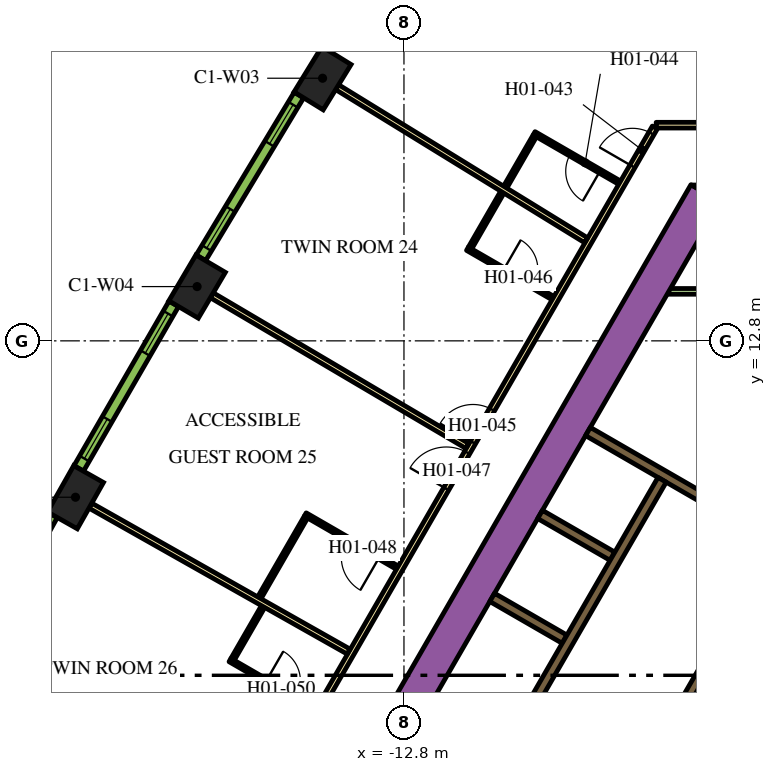
"""IFC4 building model, lengths in metres.
Left out: names, types, materials, properties, quantities, classifications, styles, units other than length and angle.
Written with IfcOpenShell. Run it as: python <this file> out.ifc"""

import sys

from ifc_helpers import new_model, si_unit, direction, frame, frame_2d, origin, origin_2d, place, context, subcontext, project, spatial, polyline, rectangle, outline, extrude, element, fill, save


model = new_model("IFC4")
c1 = context("Model", 3, precision=1e-05, world=origin(), true_north=direction((0.0, 1.0)))
c2 = subcontext(c1, "Body", "Model", "MODEL_VIEW")
j1 = project(units=[si_unit("LENGTHUNIT", "METRE"), si_unit("PLANEANGLEUNIT", "RADIAN")], contexts=[c1])
p1 = place(None, origin())
s1 = spatial("IfcSite", under=j1, at=p1, CompositionType="ELEMENT")
p2 = place(p1, origin())
s2 = spatial("IfcBuilding", under=s1, at=p2, CompositionType="ELEMENT")
p3 = place(p2, frame((0.0, 0.0, 27.6)))
s3 = spatial("IfcBuildingStorey", under=s2, at=p3, CompositionType="ELEMENT", Elevation=27.6)
for number, where, z_axis, x_axis in (
    (1, (-14.942, 19.71, 0.0), (0.0, 0.0, 1.0), (-0.524, -0.852, 0.0)),
    (2, (-18.243, 14.228, 0.0), (0.0, 0.0, 1.0), (-0.508, -0.861, 0.0)),
    (3, (-21.443, 8.685, 0.0), (0.0, 0.0, 1.0), (-0.492, -0.871, 0.0)),
):
    element("IfcColumn", number, at=place(p3, frame(where, z_axis=z_axis, x_axis=x_axis)), inside=s3, PredefinedType="COLUMN", context=c2, shape_type="SweptSolid", body=[
        extrude(rectangle(XDim=1.4, YDim=0.9, at=origin_2d()), origin(), (0.0, 0.0, 1.0), 3.9),
    ])
p4 = place(p3, frame((-15.36, -1.503, 0.0), z_axis=(0.0, 0.0, 1.0), x_axis=(0.50000389221, 0.866023156604, 0.0)))
e4 = element("IfcWall", 4, at=p4, inside=s3, PredefinedType="SOLIDWALL", context=c2, shape_type="SweptSolid", body=[
    extrude(rectangle(XDim=21.0, YDim=0.9, at=frame_2d((10.5, 0.0))), origin(), (0.0, 0.0, 1.0), 3.9),
])
p5 = place(p3, origin())
e5 = element("IfcWall", 5, at=p5, inside=s3, PredefinedType="SOLIDWALL", context=c2, shape_type="SweptSolid", body=[
    extrude(outline(polyline([(-4.215, 16.9), (-4.469, 16.46), (-5.231, 16.9), (-4.215, 16.9)])), origin(), (0.0, 0.0, 1.0), 3.9),
])
p6 = place(p3, frame((-8.06, -1.311, 0.0), z_axis=(0.0, 0.0, 1.0), x_axis=(0.50000273126, 0.866023826885, 0.0)))
e6 = element("IfcWall", 6, at=p6, inside=s3, PredefinedType="SOLIDWALL", context=c2, shape_type="SweptSolid", body=[
    extrude(rectangle(XDim=10.33, YDim=0.25, at=frame_2d((5.165, 0.0))), origin(), (0.0, 0.0, 1.0), 3.9),
])
for number, where, z_axis, x_axis in (
    (7, (-8.574, 4.95, 0.0), (0.0, 0.0, 1.0), (-0.866, 0.5, 0.0)),
    (8, (-7.314, 7.132, 0.0), (0.0, 0.0, 1.0), (-0.866, 0.5, 0.0)),
):
    element("IfcWall", number, at=place(p3, frame(where, z_axis=z_axis, x_axis=x_axis)), inside=s3, PredefinedType="SOLIDWALL", context=c2, shape_type="SweptSolid", body=[
        extrude(rectangle(XDim=2.2, YDim=0.25, at=frame_2d((1.1, 0.0))), origin(), (0.0, 0.0, 1.0), 3.9),
    ])
p7 = place(p3, frame((-7.959, 10.415, 0.0), z_axis=(0.0, 0.0, 1.0), x_axis=(0.866020958405, -0.500007699544, 0.0)))
e9 = element("IfcWall", 9, at=p7, inside=s3, PredefinedType="SOLIDWALL", context=c2, shape_type="SweptSolid", body=[
    extrude(rectangle(XDim=4.1, YDim=0.25, at=frame_2d((2.05, 0.0))), origin(), (0.0, 0.0, 1.0), 3.9),
])
p8 = place(p3, frame((-5.851, 14.102, 0.0), z_axis=(0.0, 0.0, 1.0), x_axis=(1.0, 0.0, 0.0)))
e10 = element("IfcWall", 10, at=p8, inside=s3, PredefinedType="PARTITIONING", context=c2, shape_type="SweptSolid", body=[
    extrude(rectangle(XDim=1.18, YDim=0.15, at=frame_2d((0.59, 0.0))), origin(), (0.0, 0.0, 1.0), 2.75),
])
p9 = place(p3, frame((-6.008, 9.144, 0.0), z_axis=(0.0, 0.0, 1.0), x_axis=(-0.500006956611, -0.866021387346, 0.0)))
e11 = element("IfcWall", 11, at=p9, inside=s3, PredefinedType="SOLIDWALL", context=c2, shape_type="SweptSolid", body=[
    extrude(rectangle(XDim=9.83, YDim=0.25, at=frame_2d((4.915, 0.0))), origin(), (0.0, 0.0, 1.0), 3.9),
])
p10 = place(p9, frame((6.985, 0.0, 0.0)))
e12 = element("IfcOpeningElement", 12, at=p10, cuts=e11, PredefinedType="OPENING", context=c2, shape_type="SweptSolid", body=[
    extrude(rectangle(XDim=0.9, YDim=2.1, at=frame_2d((0.45, 1.05))), frame((0.0, 0.135, 0.0), z_axis=(0.0, -1.0, 0.0), x_axis=(1.0, 0.0, 0.0)), (0.0, 0.0, 1.0), 0.27),
])
p11 = place(p3, frame((-0.898, 6.194, 0.0), z_axis=(0.0, 0.0, 1.0), x_axis=(-0.499996202215, -0.866027596426, 0.0)))
e13 = element("IfcWall", 13, at=p11, inside=s3, PredefinedType="SOLIDWALL", context=c2, shape_type="SweptSolid", body=[
    extrude(rectangle(XDim=9.83, YDim=0.25, at=frame_2d((4.915, 0.0))), origin(), (0.0, 0.0, 1.0), 3.9),
])
p12 = place(p11, frame((0.585, 0.0, 0.0)))
e14 = element("IfcOpeningElement", 14, at=p12, cuts=e13, PredefinedType="OPENING", context=c2, shape_type="SweptSolid", body=[
    extrude(rectangle(XDim=1.1, YDim=2.1, at=frame_2d((0.55, 1.05))), frame((0.0, 0.135, 0.0), z_axis=(0.0, -1.0, 0.0), x_axis=(1.0, 0.0, 0.0)), (0.0, 0.0, 1.0), 0.27),
])
p13 = place(p11, frame((3.105, 0.0, 0.0)))
e15 = element("IfcOpeningElement", 15, at=p13, cuts=e13, PredefinedType="OPENING", context=c2, shape_type="SweptSolid", body=[
    extrude(rectangle(XDim=1.1, YDim=2.1, at=frame_2d((0.55, 1.05))), frame((0.0, 0.135, 0.0), z_axis=(0.0, -1.0, 0.0), x_axis=(1.0, 0.0, 0.0)), (0.0, 0.0, 1.0), 0.27),
])
p14 = place(p11, frame((5.625, 0.0, 0.0)))
e16 = element("IfcOpeningElement", 16, at=p14, cuts=e13, PredefinedType="OPENING", context=c2, shape_type="SweptSolid", body=[
    extrude(rectangle(XDim=1.1, YDim=2.1, at=frame_2d((0.55, 1.05))), frame((0.0, 0.135, 0.0), z_axis=(0.0, -1.0, 0.0), x_axis=(1.0, 0.0, 0.0)), (0.0, 0.0, 1.0), 0.27),
])
p15 = place(p11, frame((8.145, 0.0, 0.0)))
e17 = element("IfcOpeningElement", 17, at=p15, cuts=e13, PredefinedType="OPENING", context=c2, shape_type="SweptSolid", body=[
    extrude(rectangle(XDim=1.1, YDim=2.1, at=frame_2d((0.55, 1.05))), frame((0.0, 0.135, 0.0), z_axis=(0.0, -1.0, 0.0), x_axis=(1.0, 0.0, 0.0)), (0.0, 0.0, 1.0), 0.27),
])
p16 = place(p3, frame((-6.163, 18.475, 0.0), z_axis=(0.0, 0.0, 1.0), x_axis=(1.0, 0.0, 0.0)))
e18 = element("IfcWall", 18, at=p16, inside=s3, PredefinedType="PARTITIONING", context=c2, shape_type="SweptSolid", body=[
    extrude(rectangle(XDim=5.258, YDim=0.15, at=frame_2d((2.629, 0.0))), origin(), (0.0, 0.0, 1.0), 2.75),
])
p17 = place(p3, frame((-19.081, -3.9, 0.0), z_axis=(0.0, 0.0, 1.0), x_axis=(0.499998313975, 0.866026377209, 0.0)))
e19 = element("IfcWall", 19, at=p17, inside=s3, PredefinedType="PARTITIONING", context=c2, shape_type="SweptSolid", body=[
    extrude(rectangle(XDim=25.766, YDim=0.15, at=frame_2d((12.883, 0.0))), origin(), (0.0, 0.0, 1.0), 2.75),
])
p18 = place(p17, frame((24.586, 0.0, 0.0)))
e20 = element("IfcOpeningElement", 20, at=p18, cuts=e19, PredefinedType="OPENING", context=c2, shape_type="SweptSolid", body=[
    extrude(rectangle(XDim=1.0, YDim=2.1, at=frame_2d((0.5, 1.05))), frame((0.0, 0.085, 0.0), z_axis=(0.0, -1.0, 0.0), x_axis=(1.0, 0.0, 0.0)), (0.0, 0.0, 1.0), 0.17),
])
p19 = place(p17, frame((16.196, 0.0, 0.0)))
e21 = element("IfcOpeningElement", 21, at=p19, cuts=e19, PredefinedType="OPENING", context=c2, shape_type="SweptSolid", body=[
    extrude(rectangle(XDim=1.0, YDim=2.1, at=frame_2d((0.5, 1.05))), frame((0.0, 0.085, 0.0), z_axis=(0.0, -1.0, 0.0), x_axis=(1.0, 0.0, 0.0)), (0.0, 0.0, 1.0), 0.17),
])
p20 = place(p17, frame((14.789, 0.0, 0.0)))
e22 = element("IfcOpeningElement", 22, at=p20, cuts=e19, PredefinedType="OPENING", context=c2, shape_type="SweptSolid", body=[
    extrude(rectangle(XDim=1.1, YDim=2.1, at=frame_2d((0.55, 1.05))), frame((0.0, 0.085, 0.0), z_axis=(0.0, -1.0, 0.0), x_axis=(1.0, 0.0, 0.0)), (0.0, 0.0, 1.0), 0.17),
])
p21 = place(p17, frame((3.698, 0.0, 0.0)))
e23 = element("IfcOpeningElement", 23, at=p21, cuts=e19, PredefinedType="OPENING", context=c2, shape_type="SweptSolid", body=[
    extrude(rectangle(XDim=1.0, YDim=2.1, at=frame_2d((0.5, 1.05))), frame((0.0, 0.085, 0.0), z_axis=(0.0, -1.0, 0.0), x_axis=(1.0, 0.0, 0.0)), (0.0, 0.0, 1.0), 0.17),
])
p22 = place(p17, frame((1.531, 0.0, 0.0)))
e24 = element("IfcOpeningElement", 24, at=p22, cuts=e19, PredefinedType="OPENING", context=c2, shape_type="SweptSolid", body=[
    extrude(rectangle(XDim=0.9, YDim=2.1, at=frame_2d((0.45, 1.05))), frame((0.0, 0.085, 0.0), z_axis=(0.0, -1.0, 0.0), x_axis=(1.0, 0.0, 0.0)), (0.0, 0.0, 1.0), 0.17),
])
p23 = place(p3, frame((-21.052, 8.464, 0.0), z_axis=(0.0, 0.0, 1.0), x_axis=(0.87059371954, -0.492002617368, 0.0)))
e25 = element("IfcWall", 25, at=p23, inside=s3, PredefinedType="PARTITIONING", context=c2, shape_type="SweptSolid", body=[
    extrude(rectangle(XDim=7.803, YDim=0.15, at=frame_2d((3.902, 0.0))), origin(), (0.0, 0.0, 1.0), 2.75),
])
p24 = place(p3, frame((-17.856, 13.999, 0.0), z_axis=(0.0, 0.0, 1.0), x_axis=(0.861371519381, -0.507975497047, 0.0)))
e26 = element("IfcWall", 26, at=p24, inside=s3, PredefinedType="PARTITIONING", context=c2, shape_type="SweptSolid", body=[
    extrude(rectangle(XDim=7.804, YDim=0.15, at=frame_2d((3.902, 0.0))), origin(), (0.0, 0.0, 1.0), 2.75),
])
p25 = place(p3, frame((-14.558, 19.475, 0.0), z_axis=(0.0, 0.0, 1.0), x_axis=(0.851829455142, -0.523819223925, 0.0)))
e27 = element("IfcWall", 27, at=p25, inside=s3, PredefinedType="PARTITIONING", context=c2, shape_type="SweptSolid", body=[
    extrude(rectangle(XDim=7.688, YDim=0.15, at=frame_2d((3.844, 0.0))), origin(), (0.0, 0.0, 1.0), 2.75),
])
p26 = place(p3, frame((-11.16, 24.888, 0.0), z_axis=(0.0, 0.0, 1.0), x_axis=(0.84199813156, -0.539480441211, 0.0)))
e28 = element("IfcWall", 28, at=p26, inside=s3, PredefinedType="PARTITIONING", context=c2, shape_type="SweptSolid", body=[
    extrude(rectangle(XDim=11.638, YDim=0.15, at=frame_2d((5.819, 0.0))), origin(), (0.0, 0.0, 1.0), 2.75),
])
p27 = place(p3, frame((-7.124, 16.961, 0.0), z_axis=(0.0, 0.0, 1.0), x_axis=(-0.866021400173, 0.500006934395, 0.0)))
e29 = element("IfcWall", 29, at=p27, inside=s3, PredefinedType="PARTITIONING", context=c2, shape_type="SweptSolid", body=[
    extrude(rectangle(XDim=2.6, YDim=0.1, at=frame_2d((1.3, 0.0))), origin(), (0.0, 0.0, 1.0), 2.75),
])
p28 = place(p27, frame((0.6, 0.0, 0.0)))
e30 = element("IfcOpeningElement", 30, at=p28, cuts=e29, PredefinedType="OPENING", context=c2, shape_type="SweptSolid", body=[
    extrude(rectangle(XDim=0.9, YDim=2.1, at=frame_2d((0.45, 1.05))), frame((0.0, 0.06, 0.0), z_axis=(0.0, -1.0, 0.0), x_axis=(1.0, 0.0, 0.0)), (0.0, 0.0, 1.0), 0.12),
])
p29 = place(p3, frame((-9.362, 18.184, 0.0), z_axis=(0.0, 0.0, 1.0), x_axis=(-0.499992328818, -0.866029832698, 0.0)))
e31 = element("IfcWall", 31, at=p29, inside=s3, PredefinedType="PARTITIONING", context=c2, shape_type="SweptSolid", body=[
    extrude(rectangle(XDim=1.54, YDim=0.1, at=frame_2d((0.77, 0.0))), origin(), (0.0, 0.0, 1.0), 2.75),
])
p30 = place(p3, frame((-11.129, 15.224, 0.0), z_axis=(0.0, 0.0, 1.0), x_axis=(0.866021400173, -0.500006934395, 0.0)))
e32 = element("IfcWall", 32, at=p30, inside=s3, PredefinedType="PARTITIONING", context=c2, shape_type="SweptSolid", body=[
    extrude(rectangle(XDim=2.6, YDim=0.1, at=frame_2d((1.3, 0.0))), origin(), (0.0, 0.0, 1.0), 2.75),
])
p31 = place(p30, frame((1.1, 0.0, 0.0)))
e33 = element("IfcOpeningElement", 33, at=p31, cuts=e32, PredefinedType="OPENING", context=c2, shape_type="SweptSolid", body=[
    extrude(rectangle(XDim=0.9, YDim=2.1, at=frame_2d((0.45, 1.05))), frame((0.0, 0.06, 0.0), z_axis=(0.0, -1.0, 0.0), x_axis=(1.0, 0.0, 0.0)), (0.0, 0.0, 1.0), 0.12),
])
p32 = place(p3, frame((-11.061, 15.242, 0.0), z_axis=(0.0, 0.0, 1.0), x_axis=(0.499976720371, 0.866038843867, 0.0)))
e34 = element("IfcWall", 34, at=p32, inside=s3, PredefinedType="PARTITIONING", context=c2, shape_type="SweptSolid", body=[
    extrude(rectangle(XDim=1.69, YDim=0.1, at=frame_2d((0.845, 0.0))), origin(), (0.0, 0.0, 1.0), 2.75),
])
p33 = place(p3, frame((-12.972, 6.831, 0.0), z_axis=(0.0, 0.0, 1.0), x_axis=(-0.866018616679, 0.500011755427, 0.0)))
e35 = element("IfcWall", 35, at=p33, inside=s3, PredefinedType="PARTITIONING", context=c2, shape_type="SweptSolid", body=[
    extrude(rectangle(XDim=2.8, YDim=0.1, at=frame_2d((1.4, 0.0))), origin(), (0.0, 0.0, 1.0), 2.75),
])
p34 = place(p33, frame((0.55, 0.0, 0.0)))
e36 = element("IfcOpeningElement", 36, at=p34, cuts=e35, PredefinedType="OPENING", context=c2, shape_type="SweptSolid", body=[
    extrude(rectangle(XDim=1.0, YDim=2.1, at=frame_2d((0.5, 1.05))), frame((0.0, 0.06, 0.0), z_axis=(0.0, -1.0, 0.0), x_axis=(1.0, 0.0, 0.0)), (0.0, 0.0, 1.0), 0.12),
])
p35 = place(p3, frame((-15.379, 8.163, 0.0), z_axis=(0.0, 0.0, 1.0), x_axis=(-0.499987006516, -0.866032905446, 0.0)))
e37 = element("IfcWall", 37, at=p35, inside=s3, PredefinedType="PARTITIONING", context=c2, shape_type="SweptSolid", body=[
    extrude(rectangle(XDim=2.45, YDim=0.1, at=frame_2d((1.225, 0.0))), origin(), (0.0, 0.0, 1.0), 2.75),
])
p36 = place(p3, frame((-17.378, 4.401, 0.0), z_axis=(0.0, 0.0, 1.0), x_axis=(0.865997922154, -0.500047596559, 0.0)))
e38 = element("IfcWall", 38, at=p36, inside=s3, PredefinedType="PARTITIONING", context=c2, shape_type="SweptSolid", body=[
    extrude(rectangle(XDim=2.6, YDim=0.1, at=frame_2d((1.3, 0.0))), origin(), (0.0, 0.0, 1.0), 2.75),
])
p37 = place(p36, frame((1.1, 0.0, 0.0)))
e39 = element("IfcOpeningElement", 39, at=p37, cuts=e38, PredefinedType="OPENING", context=c2, shape_type="SweptSolid", body=[
    extrude(rectangle(XDim=0.9, YDim=2.1, at=frame_2d((0.45, 1.05))), frame((0.0, 0.06, 0.0), z_axis=(0.0, -1.0, 0.0), x_axis=(1.0, 0.0, 0.0)), (0.0, 0.0, 1.0), 0.12),
])
p38 = place(p3, frame((-17.309, 4.419, 0.0), z_axis=(0.0, 0.0, 1.0), x_axis=(0.499880961361, 0.866094119867, 0.0)))
e40 = element("IfcWall", 40, at=p38, inside=s3, PredefinedType="PARTITIONING", context=c2, shape_type="SweptSolid", body=[
    extrude(rectangle(XDim=1.6, YDim=0.1, at=frame_2d((0.8, 0.0))), origin(), (0.0, 0.0, 1.0), 2.75),
])
p39 = place(p3, frame((-12.17, 24.699, 0.0), z_axis=(0.0, 0.0, 1.0), x_axis=(-0.531688286542, -0.846940119462, 0.0)))
e41 = element("IfcWall", 41, at=p39, inside=s3, PredefinedType="SOLIDWALL", context=c2, shape_type="SweptSolid", body=[
    extrude(rectangle(XDim=4.998, YDim=0.29, at=frame_2d((2.499, 0.0))), origin(), (0.0, 0.0, 1.0), 3.65),
])
p40 = place(p39, frame((0.297, 0.0, 0.9)))
e42 = element("IfcOpeningElement", 42, at=p40, cuts=e41, PredefinedType="OPENING", context=c2, shape_type="SweptSolid", body=[
    extrude(rectangle(XDim=1.2, YDim=2.15, at=frame_2d((0.6, 1.075))), frame((0.0, 0.155, 0.0), z_axis=(0.0, -1.0, 0.0), x_axis=(1.0, 0.0, 0.0)), (0.0, 0.0, 1.0), 0.31),
])
p41 = place(p39, frame((3.501, 0.0, 0.9)))
e43 = element("IfcOpeningElement", 43, at=p41, cuts=e41, PredefinedType="OPENING", context=c2, shape_type="SweptSolid", body=[
    extrude(rectangle(XDim=1.2, YDim=2.15, at=frame_2d((0.6, 1.075))), frame((0.0, 0.155, 0.0), z_axis=(0.0, -1.0, 0.0), x_axis=(1.0, 0.0, 0.0)), (0.0, 0.0, 1.0), 0.31),
])
p42 = place(p3, frame((-15.564, 19.267, 0.0), z_axis=(0.0, 0.0, 1.0), x_axis=(-0.515938796285, -0.856625448191, 0.0)))
e44 = element("IfcWall", 44, at=p42, inside=s3, PredefinedType="SOLIDWALL", context=c2, shape_type="SweptSolid", body=[
    extrude(rectangle(XDim=4.998, YDim=0.29, at=frame_2d((2.499, 0.0))), origin(), (0.0, 0.0, 1.0), 3.65),
])
p43 = place(p42, frame((0.297, 0.0, 0.9)))
e45 = element("IfcOpeningElement", 45, at=p43, cuts=e44, PredefinedType="OPENING", context=c2, shape_type="SweptSolid", body=[
    extrude(rectangle(XDim=1.2, YDim=2.15, at=frame_2d((0.6, 1.075))), frame((0.0, 0.155, 0.0), z_axis=(0.0, -1.0, 0.0), x_axis=(1.0, 0.0, 0.0)), (0.0, 0.0, 1.0), 0.31),
])
p44 = place(p42, frame((3.501, 0.0, 0.9)))
e46 = element("IfcOpeningElement", 46, at=p44, cuts=e44, PredefinedType="OPENING", context=c2, shape_type="SweptSolid", body=[
    extrude(rectangle(XDim=1.2, YDim=2.15, at=frame_2d((0.6, 1.075))), frame((0.0, 0.155, 0.0), z_axis=(0.0, -1.0, 0.0), x_axis=(1.0, 0.0, 0.0)), (0.0, 0.0, 1.0), 0.31),
])
p45 = place(p3, frame((-18.858, 13.773, 0.0), z_axis=(0.0, 0.0, 1.0), x_axis=(-0.50002123722, -0.866013142123, 0.0)))
e47 = element("IfcWall", 47, at=p45, inside=s3, PredefinedType="SOLIDWALL", context=c2, shape_type="SweptSolid", body=[
    extrude(rectangle(XDim=4.998, YDim=0.29, at=frame_2d((2.499, 0.0))), origin(), (0.0, 0.0, 1.0), 3.65),
])
p46 = place(p45, frame((0.297, 0.0, 0.9)))
e48 = element("IfcOpeningElement", 48, at=p46, cuts=e47, PredefinedType="OPENING", context=c2, shape_type="SweptSolid", body=[
    extrude(rectangle(XDim=1.2, YDim=2.15, at=frame_2d((0.6, 1.075))), frame((0.0, 0.155, 0.0), z_axis=(0.0, -1.0, 0.0), x_axis=(1.0, 0.0, 0.0)), (0.0, 0.0, 1.0), 0.31),
])
p47 = place(p45, frame((3.501, 0.0, 0.9)))
e49 = element("IfcOpeningElement", 49, at=p47, cuts=e47, PredefinedType="OPENING", context=c2, shape_type="SweptSolid", body=[
    extrude(rectangle(XDim=1.2, YDim=2.15, at=frame_2d((0.6, 1.075))), frame((0.0, 0.155, 0.0), z_axis=(0.0, -1.0, 0.0), x_axis=(1.0, 0.0, 0.0)), (0.0, 0.0, 1.0), 0.31),
])
p48 = place(p3, frame((-22.05, 8.22, 0.0), z_axis=(0.0, 0.0, 1.0), x_axis=(-0.483912572871, -0.875116347589, 0.0)))
e50 = element("IfcWall", 50, at=p48, inside=s3, PredefinedType="SOLIDWALL", context=c2, shape_type="SweptSolid", body=[
    extrude(rectangle(XDim=4.998, YDim=0.29, at=frame_2d((2.499, 0.0))), origin(), (0.0, 0.0, 1.0), 3.65),
])
p49 = place(p48, frame((0.297, 0.0, 0.9)))
e51 = element("IfcOpeningElement", 51, at=p49, cuts=e50, PredefinedType="OPENING", context=c2, shape_type="SweptSolid", body=[
    extrude(rectangle(XDim=1.2, YDim=2.15, at=frame_2d((0.6, 1.075))), frame((0.0, 0.155, 0.0), z_axis=(0.0, -1.0, 0.0), x_axis=(1.0, 0.0, 0.0)), (0.0, 0.0, 1.0), 0.31),
])
p50 = place(p48, frame((3.501, 0.0, 0.9)))
e52 = element("IfcOpeningElement", 52, at=p50, cuts=e50, PredefinedType="OPENING", context=c2, shape_type="SweptSolid", body=[
    extrude(rectangle(XDim=1.2, YDim=2.15, at=frame_2d((0.6, 1.075))), frame((0.0, 0.155, 0.0), z_axis=(0.0, -1.0, 0.0), x_axis=(1.0, 0.0, 0.0)), (0.0, 0.0, 1.0), 0.31),
])
p51 = place(p18, origin())
e53 = element("IfcDoor", 53, at=p51, inside=s3, OperationType="SINGLE_SWING_RIGHT", PredefinedType="DOOR", context=c2, shape_type="SweptSolid", body=[
    extrude(rectangle(XDim=1.0, YDim=2.1, at=frame_2d((0.5, 1.05))), frame((0.0, 0.025, 0.0), z_axis=(0.0, -1.0, 0.0), x_axis=(1.0, 0.0, 0.0)), (0.0, 0.0, 1.0), 0.05),
])
fill(e20, e53)
p52 = place(p28, origin())
e54 = element("IfcDoor", 54, at=p52, inside=s3, OperationType="SINGLE_SWING_LEFT", PredefinedType="DOOR", context=c2, shape_type="SweptSolid", body=[
    extrude(rectangle(XDim=0.9, YDim=2.1, at=frame_2d((0.45, 1.05))), frame((0.0, 0.025, 0.0), z_axis=(0.0, -1.0, 0.0), x_axis=(1.0, 0.0, 0.0)), (0.0, 0.0, 1.0), 0.05),
])
fill(e30, e54)
p53 = place(p19, origin())
e55 = element("IfcDoor", 55, at=p53, inside=s3, OperationType="SINGLE_SWING_LEFT", PredefinedType="DOOR", context=c2, shape_type="SweptSolid", body=[
    extrude(rectangle(XDim=1.0, YDim=2.1, at=frame_2d((0.5, 1.05))), frame((0.0, 0.025, 0.0), z_axis=(0.0, -1.0, 0.0), x_axis=(1.0, 0.0, 0.0)), (0.0, 0.0, 1.0), 0.05),
])
fill(e21, e55)
p54 = place(p31, origin())
e56 = element("IfcDoor", 56, at=p54, inside=s3, OperationType="SINGLE_SWING_RIGHT", PredefinedType="DOOR", context=c2, shape_type="SweptSolid", body=[
    extrude(rectangle(XDim=0.9, YDim=2.1, at=frame_2d((0.45, 1.05))), frame((0.0, 0.025, 0.0), z_axis=(0.0, -1.0, 0.0), x_axis=(1.0, 0.0, 0.0)), (0.0, 0.0, 1.0), 0.05),
])
fill(e33, e56)
p55 = place(p20, origin())
e57 = element("IfcDoor", 57, at=p55, inside=s3, OperationType="SINGLE_SWING_RIGHT", PredefinedType="DOOR", context=c2, shape_type="SweptSolid", body=[
    extrude(rectangle(XDim=1.1, YDim=2.1, at=frame_2d((0.55, 1.05))), frame((0.0, 0.025, 0.0), z_axis=(0.0, -1.0, 0.0), x_axis=(1.0, 0.0, 0.0)), (0.0, 0.0, 1.0), 0.05),
])
fill(e22, e57)
p56 = place(p34, origin())
e58 = element("IfcDoor", 58, at=p56, inside=s3, OperationType="SINGLE_SWING_LEFT", PredefinedType="DOOR", context=c2, shape_type="SweptSolid", body=[
    extrude(rectangle(XDim=1.0, YDim=2.1, at=frame_2d((0.5, 1.05))), frame((0.0, 0.025, 0.0), z_axis=(0.0, -1.0, 0.0), x_axis=(1.0, 0.0, 0.0)), (0.0, 0.0, 1.0), 0.05),
])
fill(e36, e58)
p57 = place(p37, origin())
e59 = element("IfcDoor", 59, at=p57, inside=s3, OperationType="SINGLE_SWING_LEFT", PredefinedType="DOOR", context=c2, shape_type="SweptSolid", body=[
    extrude(rectangle(XDim=0.9, YDim=2.1, at=frame_2d((0.45, 1.05))), frame((0.0, 0.025, 0.0), z_axis=(0.0, -1.0, 0.0), x_axis=(1.0, 0.0, 0.0)), (0.0, 0.0, 1.0), 0.05),
])
fill(e39, e59)
p58 = place(p43, origin())
e60 = element("IfcWindow", 60, at=p58, inside=s3, PartitioningType="DOUBLE_PANEL_VERTICAL", PredefinedType="WINDOW", context=c2, shape_type="SweptSolid", body=[
    extrude(rectangle(XDim=1.2, YDim=2.15, at=frame_2d((0.6, 1.075))), frame((0.0, 0.015, 0.0), z_axis=(0.0, -1.0, 0.0), x_axis=(1.0, 0.0, 0.0)), (0.0, 0.0, 1.0), 0.06),
])
fill(e45, e60)
p59 = place(p44, origin())
e61 = element("IfcWindow", 61, at=p59, inside=s3, PartitioningType="DOUBLE_PANEL_VERTICAL", PredefinedType="WINDOW", context=c2, shape_type="SweptSolid", body=[
    extrude(rectangle(XDim=1.2, YDim=2.15, at=frame_2d((0.6, 1.075))), frame((0.0, 0.015, 0.0), z_axis=(0.0, -1.0, 0.0), x_axis=(1.0, 0.0, 0.0)), (0.0, 0.0, 1.0), 0.06),
])
fill(e46, e61)
p60 = place(p46, origin())
e62 = element("IfcWindow", 62, at=p60, inside=s3, PartitioningType="DOUBLE_PANEL_VERTICAL", PredefinedType="WINDOW", context=c2, shape_type="SweptSolid", body=[
    extrude(rectangle(XDim=1.2, YDim=2.15, at=frame_2d((0.6, 1.075))), frame((0.0, 0.015, 0.0), z_axis=(0.0, -1.0, 0.0), x_axis=(1.0, 0.0, 0.0)), (0.0, 0.0, 1.0), 0.06),
])
fill(e48, e62)
p61 = place(p47, origin())
e63 = element("IfcWindow", 63, at=p61, inside=s3, PartitioningType="DOUBLE_PANEL_VERTICAL", PredefinedType="WINDOW", context=c2, shape_type="SweptSolid", body=[
    extrude(rectangle(XDim=1.2, YDim=2.15, at=frame_2d((0.6, 1.075))), frame((0.0, 0.015, 0.0), z_axis=(0.0, -1.0, 0.0), x_axis=(1.0, 0.0, 0.0)), (0.0, 0.0, 1.0), 0.06),
])
fill(e49, e63)
save(model, sys.argv[1])
